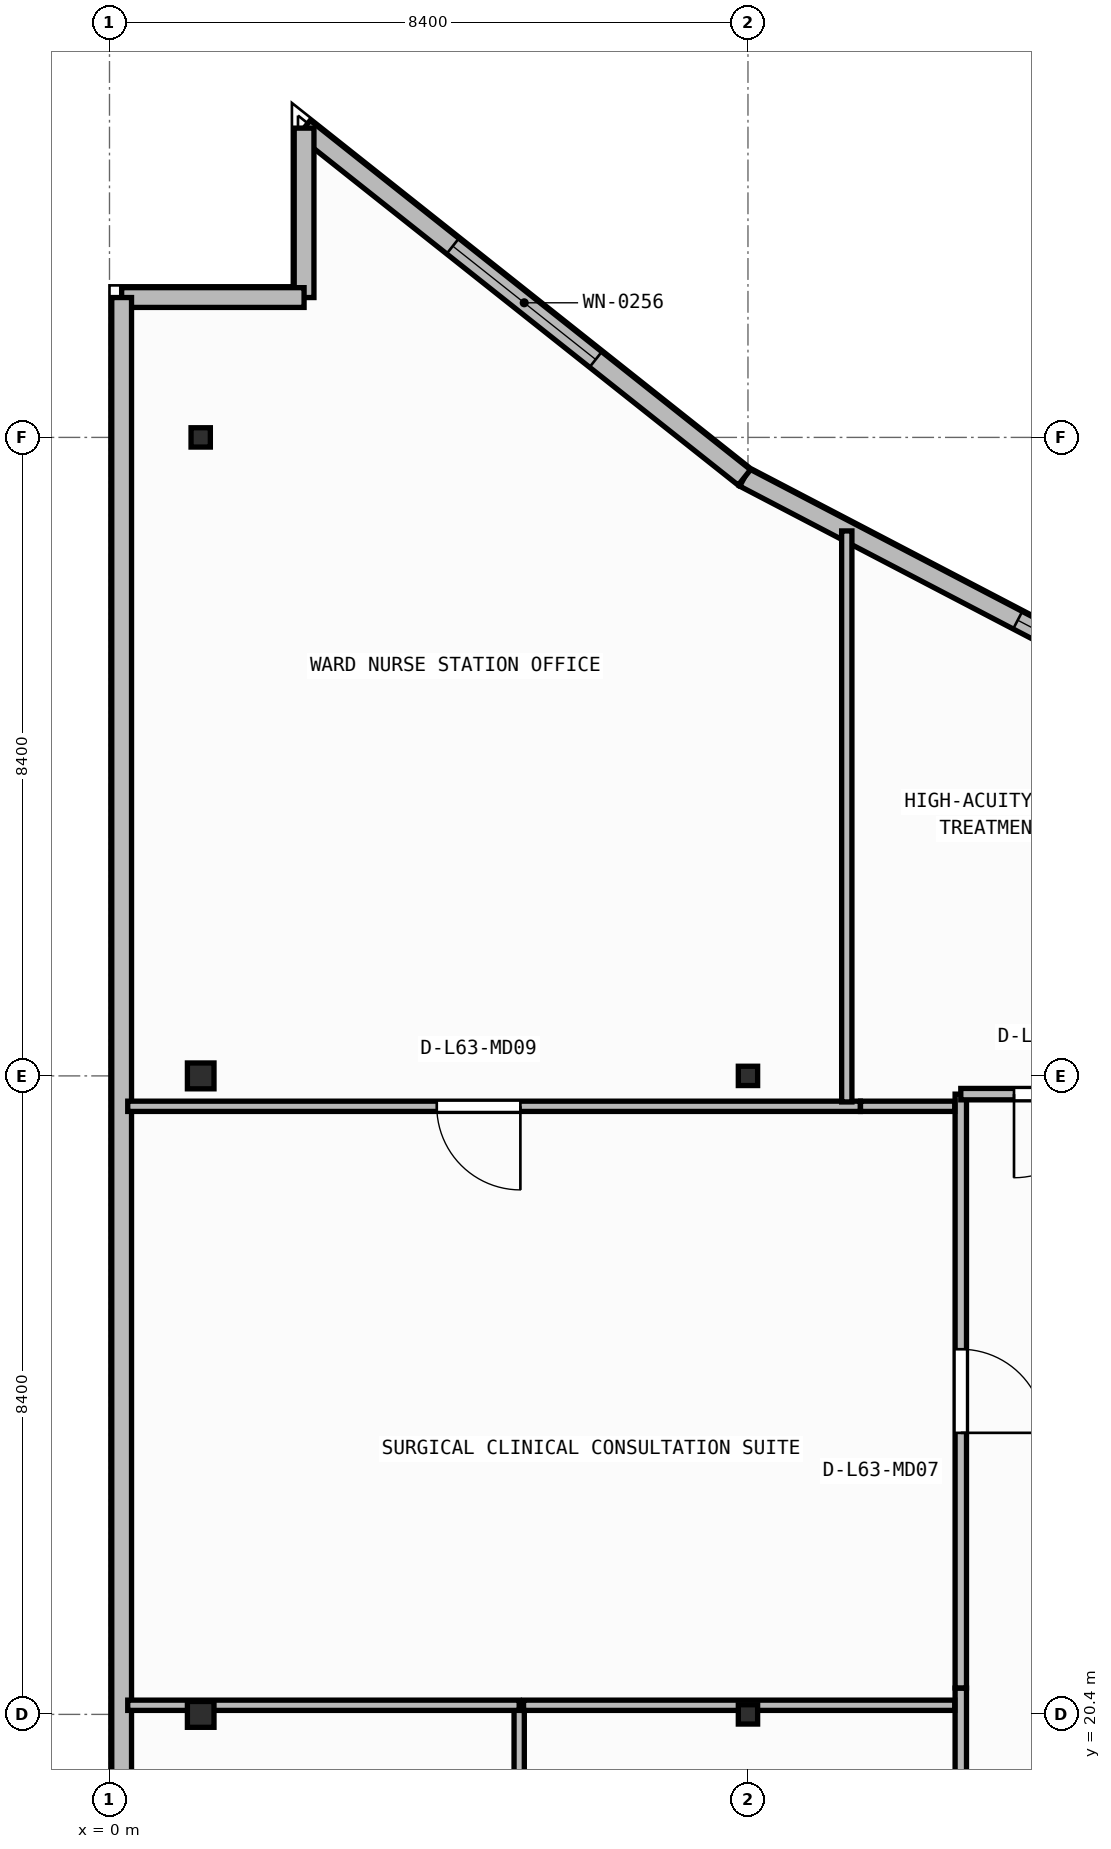
"""IFC4 building model, lengths in metres.
Left out: names, types, materials, properties, quantities, classifications, styles, units other than length and angle.
Written with IfcOpenShell. Run it as: python <this file> out.ifc"""

import sys

from ifc_helpers import new_model, si_unit, direction, frame, frame_2d, origin, origin_2d, place, context, subcontext, project, spatial, rectangle, i_section, extrude, element, fill, save


model = new_model("IFC4")
c1 = context("Model", 3, precision=1e-05, world=origin(), true_north=direction((0.0, 1.0)))
c2 = subcontext(c1, "Body", "Model", "MODEL_VIEW")
j1 = project(units=[si_unit("LENGTHUNIT", "METRE"), si_unit("PLANEANGLEUNIT", "RADIAN")], contexts=[c1])
p1 = place(None, origin())
s1 = spatial("IfcSite", under=j1, at=p1, CompositionType="ELEMENT")
p2 = place(p1, origin())
s2 = spatial("IfcBuilding", under=s1, at=p2, CompositionType="ELEMENT")
p3 = place(p2, frame((0.0, 0.0, 256.55)))
s3 = spatial("IfcBuildingStorey", under=s2, at=p3, CompositionType="ELEMENT", Elevation=256.55)
p4 = place(p3, frame((1.2, 20.4, 0.0), z_axis=(0.0, 0.0, 1.0), x_axis=(1.0, 0.0, 0.0)))
e1 = element("IfcColumn", 1, at=p4, inside=s3, PredefinedType="COLUMN", context=c2, shape_type="SweptSolid", body=[
    extrude(i_section(OverallWidth=0.35, OverallDepth=0.34, WebThickness=0.016, FlangeThickness=0.028, at=origin_2d()), origin(), (0.0, 0.0, 1.0), 3.95),
])
p5 = place(p3, frame((8.4, 20.4, 0.0), z_axis=(0.0, 0.0, 1.0), x_axis=(1.0, 0.0, 0.0)))
e2 = element("IfcColumn", 2, at=p5, inside=s3, PredefinedType="COLUMN", context=c2, shape_type="SweptSolid", body=[
    extrude(i_section(OverallWidth=0.254, OverallDepth=0.254, WebThickness=0.009, FlangeThickness=0.014, FilletRadius=0.013, at=origin_2d()), origin(), (0.0, 0.0, 1.0), 3.95),
])
p6 = place(p3, frame((1.2, 28.8, 0.0), z_axis=(0.0, 0.0, 1.0), x_axis=(1.0, 0.0, 0.0)))
e3 = element("IfcColumn", 3, at=p6, inside=s3, PredefinedType="COLUMN", context=c2, shape_type="SweptSolid", body=[
    extrude(i_section(OverallWidth=0.35, OverallDepth=0.34, WebThickness=0.016, FlangeThickness=0.028, at=origin_2d()), origin(), (0.0, 0.0, 1.0), 3.95),
])
for number, where, z_axis, x_axis in (
    (4, (8.4, 28.8, 0.0), (0.0, 0.0, 1.0), (1.0, 0.0, 0.0)),
    (5, (1.2, 37.2, 0.0), (0.0, 0.0, 1.0), (1.0, 0.0, 0.0)),
):
    element("IfcColumn", number, at=place(p3, frame(where, z_axis=z_axis, x_axis=x_axis)), inside=s3, PredefinedType="COLUMN", context=c2, shape_type="SweptSolid", body=[
        extrude(i_section(OverallWidth=0.254, OverallDepth=0.254, WebThickness=0.009, FlangeThickness=0.014, FilletRadius=0.013, at=origin_2d()), origin(), (0.0, 0.0, 1.0), 3.95),
    ])
p7 = place(p3, frame((17.673, 31.806, 0.0), z_axis=(0.0, 0.0, 1.0), x_axis=(-0.886426635565, 0.462869117311, 0.0)))
e6 = element("IfcWall", 6, at=p7, inside=s3, PredefinedType="STANDARD", context=c2, shape_type="SweptSolid", body=[
    extrude(rectangle(XDim=10.514, YDim=0.26, at=frame_2d((5.257, 0.0))), origin(), (0.0, 0.0, 1.0), 3.71),
])
p8 = place(p7, frame((4.057, 0.0, 0.9)))
e7 = element("IfcOpeningElement", 7, at=p8, cuts=e6, PredefinedType="OPENING", context=c2, shape_type="SweptSolid", body=[
    extrude(rectangle(XDim=2.4, YDim=1.65, at=frame_2d((1.2, 0.825))), frame((0.0, 0.14, 0.0), z_axis=(0.0, -1.0, 0.0), x_axis=(1.0, 0.0, 0.0)), (0.0, 0.0, 1.0), 0.28),
])
p9 = place(p3, frame((8.353, 36.673, 0.0), z_axis=(0.0, 0.0, 1.0), x_axis=(-0.783387911746, 0.621533088203, 0.0)))
e8 = element("IfcWall", 8, at=p9, inside=s3, PredefinedType="STANDARD", context=c2, shape_type="SweptSolid", body=[
    extrude(rectangle(XDim=7.394, YDim=0.26, at=frame_2d((3.697, 0.0))), origin(), (0.0, 0.0, 1.0), 3.71),
])
p10 = place(p9, frame((2.497, 0.0, 0.9)))
e9 = element("IfcOpeningElement", 9, at=p10, cuts=e8, PredefinedType="OPENING", context=c2, shape_type="SweptSolid", body=[
    extrude(rectangle(XDim=2.4, YDim=1.65, at=frame_2d((1.2, 0.825))), frame((0.0, 0.14, 0.0), z_axis=(0.0, -1.0, 0.0), x_axis=(1.0, 0.0, 0.0)), (0.0, 0.0, 1.0), 0.28),
])
p11 = place(p3, frame((2.56, 41.269, 0.0), z_axis=(0.0, 0.0, 1.0), x_axis=(0.0, -1.0, 0.0)))
e10 = element("IfcWall", 10, at=p11, inside=s3, PredefinedType="STANDARD", context=c2, shape_type="SweptSolid", body=[
    extrude(rectangle(XDim=2.229, YDim=0.26, at=frame_2d((1.114, 0.0))), origin(), (0.0, 0.0, 1.0), 3.71),
])
p12 = place(p3, frame((2.56, 39.04, 0.0), z_axis=(0.0, 0.0, 1.0), x_axis=(-1.0, 0.0, 0.0)))
e11 = element("IfcWall", 11, at=p12, inside=s3, PredefinedType="STANDARD", context=c2, shape_type="SweptSolid", body=[
    extrude(rectangle(XDim=2.4, YDim=0.26, at=frame_2d((1.2, 0.0))), origin(), (0.0, 0.0, 1.0), 3.71),
])
p13 = place(p3, frame((0.16, 39.04, 0.0), z_axis=(0.0, 0.0, 1.0), x_axis=(0.0, -1.0, 0.0)))
e12 = element("IfcWall", 12, at=p13, inside=s3, PredefinedType="STANDARD", context=c2, shape_type="SweptSolid", body=[
    extrude(rectangle(XDim=36.48, YDim=0.26, at=frame_2d((18.24, 0.0))), origin(), (0.0, 0.0, 1.0), 3.71),
])
p14 = place(p13, frame((26.31, 0.0, 0.9)))
e13 = element("IfcOpeningElement", 13, at=p14, cuts=e12, PredefinedType="OPENING", context=c2, shape_type="SweptSolid", body=[
    extrude(rectangle(XDim=2.4, YDim=1.65, at=frame_2d((1.2, 0.825))), frame((0.0, 0.14, 0.0), z_axis=(0.0, -1.0, 0.0), x_axis=(1.0, 0.0, 0.0)), (0.0, 0.0, 1.0), 0.28),
])
p15 = place(p3, frame((11.2, 20.746, 0.0), z_axis=(0.0, 0.0, 1.0), x_axis=(0.0, -1.0, 0.0)))
e14 = element("IfcWall", 14, at=p15, inside=s3, PredefinedType="PARTITIONING", context=c2, shape_type="SweptSolid", body=[
    extrude(rectangle(XDim=6.046, YDim=0.15, at=frame_2d((3.023, 0.0))), origin(), (0.0, 0.0, 1.0), 3.71),
])
p16 = place(p3, frame((11.2, 28.56, 0.0), z_axis=(0.0, 0.0, 1.0), x_axis=(0.0, -1.0, 0.0)))
e15 = element("IfcWall", 15, at=p16, inside=s3, PredefinedType="PARTITIONING", context=c2, shape_type="SweptSolid", body=[
    extrude(rectangle(XDim=7.812, YDim=0.15, at=frame_2d((3.906, 0.0))), origin(), (0.0, 0.0, 1.0), 3.71),
])
p17 = place(p16, frame((3.356, 0.0, 0.0)))
e16 = element("IfcOpeningElement", 16, at=p17, cuts=e15, PredefinedType="OPENING", context=c2, shape_type="SweptSolid", body=[
    extrude(rectangle(XDim=1.1, YDim=2.1, at=frame_2d((0.55, 1.05))), frame((0.0, 0.085, 0.0), z_axis=(0.0, -1.0, 0.0), x_axis=(1.0, 0.0, 0.0)), (0.0, 0.0, 1.0), 0.17),
])
p18 = place(p3, frame((13.7, 28.56, 0.0), z_axis=(0.0, 0.0, 1.0), x_axis=(-1.0, 0.0, 0.0)))
e17 = element("IfcWall", 17, at=p18, inside=s3, PredefinedType="PARTITIONING", context=c2, shape_type="SweptSolid", body=[
    extrude(rectangle(XDim=2.5, YDim=0.15, at=frame_2d((1.25, 0.0))), origin(), (0.0, 0.0, 1.0), 3.157),
])
p19 = place(p18, frame((0.7, 0.0, 0.0)))
e18 = element("IfcOpeningElement", 18, at=p19, cuts=e17, PredefinedType="OPENING", context=c2, shape_type="SweptSolid", body=[
    extrude(rectangle(XDim=1.1, YDim=2.1, at=frame_2d((0.55, 1.05))), frame((0.0, 0.085, 0.0), z_axis=(0.0, -1.0, 0.0), x_axis=(1.0, 0.0, 0.0)), (0.0, 0.0, 1.0), 0.17),
])
p20 = place(p3, frame((5.39, 17.14, 0.0), z_axis=(0.0, 0.0, 1.0), x_axis=(0.0, 1.0, 0.0)))
e19 = element("IfcWall", 19, at=p20, inside=s3, PredefinedType="PARTITIONING", context=c2, shape_type="SweptSolid", body=[
    extrude(rectangle(XDim=3.38, YDim=0.135, at=frame_2d((1.69, 0.0))), origin(), (0.0, 0.0, 1.0), 3.71),
])
p21 = place(p3, frame((5.39, 20.52, 0.0), z_axis=(0.0, 0.0, 1.0), x_axis=(-1.0, 0.0, 0.0)))
e20 = element("IfcWall", 20, at=p21, inside=s3, PredefinedType="PARTITIONING", context=c2, shape_type="SweptSolid", body=[
    extrude(rectangle(XDim=5.15, YDim=0.135, at=frame_2d((2.575, 0.0))), origin(), (0.0, 0.0, 1.0), 3.157),
])
p22 = place(p3, frame((11.12, 20.52, 0.0), z_axis=(0.0, 0.0, 1.0), x_axis=(-1.0, 0.0, 0.0)))
e21 = element("IfcWall", 21, at=p22, inside=s3, PredefinedType="PARTITIONING", context=c2, shape_type="SweptSolid", body=[
    extrude(rectangle(XDim=5.673, YDim=0.135, at=frame_2d((2.836, 0.0))), origin(), (0.0, 0.0, 1.0), 3.157),
])
p23 = place(p3, frame((9.878, 28.4, 0.0), z_axis=(0.0, 0.0, 1.0), x_axis=(-1.0, 0.0, 0.0)))
e22 = element("IfcWall", 22, at=p23, inside=s3, PredefinedType="PARTITIONING", context=c2, shape_type="SweptSolid", body=[
    extrude(rectangle(XDim=9.638, YDim=0.135, at=frame_2d((4.819, 0.0))), origin(), (0.0, 0.0, 1.0), 3.157),
])
p24 = place(p23, frame((4.473, 0.0, 0.0)))
e23 = element("IfcOpeningElement", 23, at=p24, cuts=e22, PredefinedType="OPENING", context=c2, shape_type="SweptSolid", body=[
    extrude(rectangle(XDim=1.1, YDim=2.1, at=frame_2d((0.55, 1.05))), frame((0.0, 0.077, 0.0), z_axis=(0.0, -1.0, 0.0), x_axis=(1.0, 0.0, 0.0)), (0.0, 0.0, 1.0), 0.155),
])
p25 = place(p3, frame((11.12, 28.4, 0.0), z_axis=(0.0, 0.0, 1.0), x_axis=(-1.0, 0.0, 0.0)))
e24 = element("IfcWall", 24, at=p25, inside=s3, PredefinedType="PARTITIONING", context=c2, shape_type="SweptSolid", body=[
    extrude(rectangle(XDim=1.24, YDim=0.135, at=frame_2d((0.62, 0.0))), origin(), (0.0, 0.0, 1.0), 3.157),
])
p26 = place(p3, frame((9.7, 28.458, 0.0), z_axis=(0.0, 0.0, 1.0), x_axis=(0.0, 1.0, 0.0)))
e25 = element("IfcWall", 25, at=p26, inside=s3, PredefinedType="PARTITIONING", context=c2, shape_type="SweptSolid", body=[
    extrude(rectangle(XDim=7.512, YDim=0.135, at=frame_2d((3.756, 0.0))), origin(), (0.0, 0.0, 1.0), 3.71),
])
p27 = place(p8, origin())
e26 = element("IfcWindow", 26, at=p27, inside=s3, PartitioningType="SINGLE_PANEL", PredefinedType="WINDOW", context=c2, shape_type="SweptSolid", body=[
    extrude(rectangle(XDim=2.4, YDim=1.65, at=frame_2d((1.2, 0.825))), frame((0.0, 0.03, 0.0), z_axis=(0.0, -1.0, 0.0), x_axis=(1.0, 0.0, 0.0)), (0.0, 0.0, 1.0), 0.06),
])
fill(e7, e26)
p28 = place(p10, origin())
e27 = element("IfcWindow", 27, at=p28, inside=s3, PartitioningType="SINGLE_PANEL", PredefinedType="WINDOW", context=c2, shape_type="SweptSolid", body=[
    extrude(rectangle(XDim=2.4, YDim=1.65, at=frame_2d((1.2, 0.825))), frame((0.0, 0.03, 0.0), z_axis=(0.0, -1.0, 0.0), x_axis=(1.0, 0.0, 0.0)), (0.0, 0.0, 1.0), 0.06),
])
fill(e9, e27)
p29 = place(p17, origin())
e28 = element("IfcDoor", 28, at=p29, inside=s3, OperationType="SINGLE_SWING_RIGHT", PredefinedType="DOOR", context=c2, shape_type="SweptSolid", body=[
    extrude(rectangle(XDim=1.1, YDim=2.1, at=frame_2d((0.55, 1.05))), frame((0.0, 0.025, 0.0), z_axis=(0.0, -1.0, 0.0), x_axis=(1.0, 0.0, 0.0)), (0.0, 0.0, 1.0), 0.05),
])
fill(e16, e28)
p30 = place(p19, origin())
e29 = element("IfcDoor", 29, at=p30, inside=s3, OperationType="SINGLE_SWING_RIGHT", PredefinedType="DOOR", context=c2, shape_type="SweptSolid", body=[
    extrude(rectangle(XDim=1.1, YDim=2.1, at=frame_2d((0.55, 1.05))), frame((0.0, 0.025, 0.0), z_axis=(0.0, -1.0, 0.0), x_axis=(1.0, 0.0, 0.0)), (0.0, 0.0, 1.0), 0.05),
])
fill(e18, e29)
p31 = place(p24, origin())
e30 = element("IfcDoor", 30, at=p31, inside=s3, OperationType="SINGLE_SWING_LEFT", PredefinedType="DOOR", context=c2, shape_type="SweptSolid", body=[
    extrude(rectangle(XDim=1.1, YDim=2.1, at=frame_2d((0.55, 1.05))), frame((0.0, 0.025, 0.0), z_axis=(0.0, -1.0, 0.0), x_axis=(1.0, 0.0, 0.0)), (0.0, 0.0, 1.0), 0.05),
])
fill(e23, e30)
save(model, sys.argv[1])
